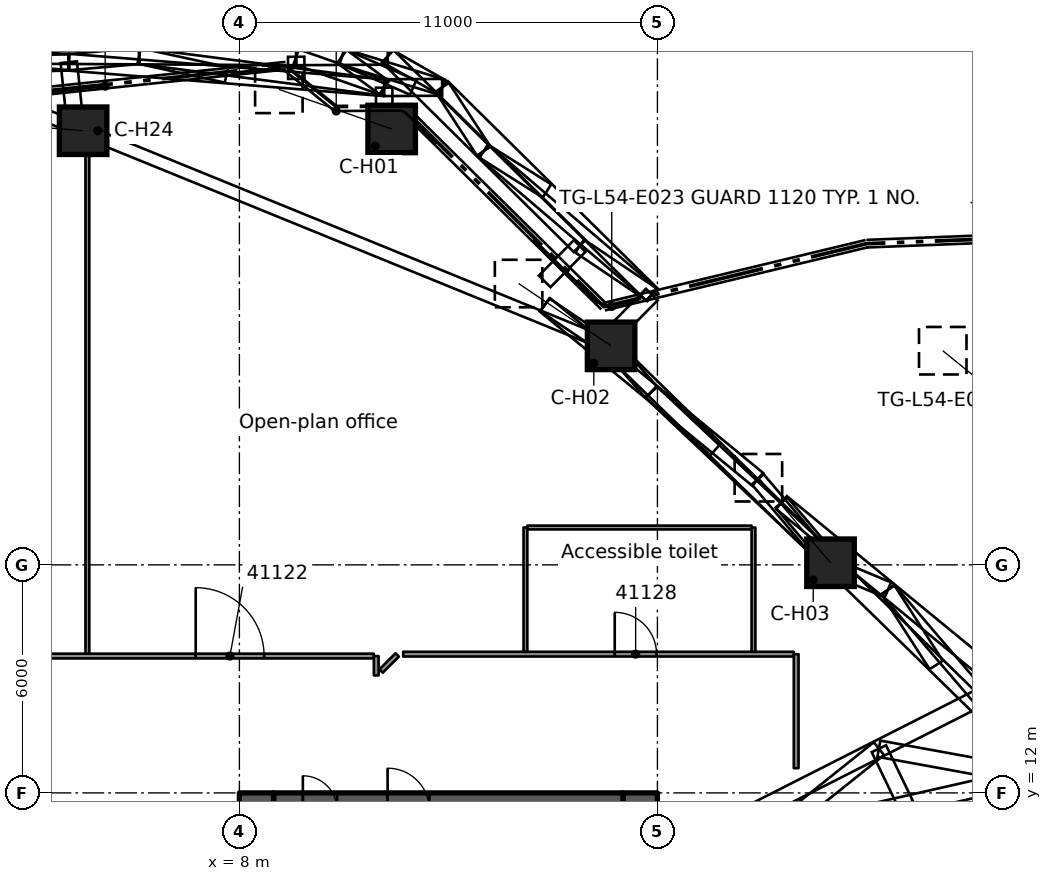
"""IFC4 building model, lengths in metres.
Left out: names, types, materials, properties, quantities, classifications, styles, units other than length and angle.
Written with IfcOpenShell. Run it as: python <this file> out.ifc"""

import sys

from ifc_helpers import new_model, si_unit, direction, frame, frame_2d, origin, origin_2d, place, context, subcontext, project, spatial, rectangle, extrude, element, fill, save


model = new_model("IFC4")
c1 = context("Model", 3, precision=1e-05, world=origin(), true_north=direction((0.0, 1.0)))
c2 = subcontext(c1, "Body", "Model", "MODEL_VIEW")
j1 = project(units=[si_unit("LENGTHUNIT", "METRE"), si_unit("PLANEANGLEUNIT", "RADIAN")], contexts=[c1])
p1 = place(None, origin())
s1 = spatial("IfcSite", under=j1, at=p1, CompositionType="ELEMENT")
p2 = place(p1, origin())
s2 = spatial("IfcBuilding", under=s1, at=p2, CompositionType="ELEMENT")
p3 = place(p2, frame((0.0, 0.0, 206.1)))
s3 = spatial("IfcBuildingStorey", under=s2, at=p3, CompositionType="ELEMENT", Elevation=206.1)
p4 = place(p3, frame((8.9, 11.55, 0.0), z_axis=(0.0, 0.0, 1.0), x_axis=(1.0, 0.0, 0.0)))
e1 = element("IfcWall", 1, at=p4, inside=s3, PredefinedType="SHEAR", context=c2, shape_type="SweptSolid", body=[
    extrude(rectangle(XDim=9.2, YDim=0.9, at=frame_2d((4.6, 0.0))), origin(), (0.0, 0.0, 1.0), 4.4),
])
p5 = place(p4, frame((3.0, 0.0, 0.0)))
e2 = element("IfcOpeningElement", 2, at=p5, cuts=e1, PredefinedType="OPENING", context=c2, shape_type="SweptSolid", body=[
    extrude(rectangle(XDim=1.1, YDim=2.1, at=frame_2d((0.55, 1.05))), frame((0.0, 0.46, 0.0), z_axis=(0.0, -1.0, 0.0), x_axis=(1.0, 0.0, 0.0)), (0.0, 0.0, 1.0), 0.92),
])
p6 = place(p4, frame((0.77, 0.0, 0.0)))
e3 = element("IfcOpeningElement", 3, at=p6, cuts=e1, PredefinedType="OPENING", context=c2, shape_type="SweptSolid", body=[
    extrude(rectangle(XDim=0.9, YDim=2.1, at=frame_2d((0.45, 1.05))), frame((0.0, 0.46, 0.0), z_axis=(0.0, -1.0, 0.0), x_axis=(1.0, 0.0, 0.0)), (0.0, 0.0, 1.0), 0.92),
])
p7 = place(p3, frame((8.45, -12.0, 0.0), z_axis=(0.0, 0.0, 1.0), x_axis=(0.0, 1.0, 0.0)))
e4 = element("IfcWall", 4, at=p7, inside=s3, PredefinedType="SHEAR", context=c2, shape_type="SweptSolid", body=[
    extrude(rectangle(XDim=24.0, YDim=0.9, at=frame_2d((12.0, 0.0))), origin(), (0.0, 0.0, 1.0), 4.4),
])
p8 = place(p7, frame((12.6, 0.0, 0.0)))
e5 = element("IfcOpeningElement", 5, at=p8, cuts=e4, PredefinedType="OPENING", context=c2, shape_type="SweptSolid", body=[
    extrude(rectangle(XDim=1.8, YDim=2.1, at=frame_2d((0.9, 1.05))), frame((0.0, 0.46, 0.0), z_axis=(0.0, -1.0, 0.0), x_axis=(1.0, 0.0, 0.0)), (0.0, 0.0, 1.0), 0.92),
])
p9 = place(p7, frame((16.3, 0.0, 0.0)))
e6 = element("IfcOpeningElement", 6, at=p9, cuts=e4, PredefinedType="OPENING", context=c2, shape_type="SweptSolid", body=[
    extrude(rectangle(XDim=1.8, YDim=2.1, at=frame_2d((0.9, 1.05))), frame((0.0, 0.46, 0.0), z_axis=(0.0, -1.0, 0.0), x_axis=(1.0, 0.0, 0.0)), (0.0, 0.0, 1.0), 0.92),
])
p10 = place(p7, frame((9.6, 0.0, 0.0)))
e7 = element("IfcOpeningElement", 7, at=p10, cuts=e4, PredefinedType="OPENING", context=c2, shape_type="SweptSolid", body=[
    extrude(rectangle(XDim=1.8, YDim=2.1, at=frame_2d((0.9, 1.05))), frame((0.0, 0.46, 0.0), z_axis=(0.0, -1.0, 0.0), x_axis=(1.0, 0.0, 0.0)), (0.0, 0.0, 1.0), 0.92),
])
p11 = place(p7, frame((3.25, 0.0, 0.0)))
e8 = element("IfcOpeningElement", 8, at=p11, cuts=e4, PredefinedType="OPENING", context=c2, shape_type="SweptSolid", body=[
    extrude(rectangle(XDim=1.1, YDim=2.1, at=frame_2d((0.55, 1.05))), frame((0.0, 0.46, 0.0), z_axis=(0.0, -1.0, 0.0), x_axis=(1.0, 0.0, 0.0)), (0.0, 0.0, 1.0), 0.92),
])
p12 = place(p3, frame((18.55, -12.0, 0.0), z_axis=(0.0, 0.0, 1.0), x_axis=(0.0, 1.0, 0.0)))
e9 = element("IfcWall", 9, at=p12, inside=s3, PredefinedType="SHEAR", context=c2, shape_type="SweptSolid", body=[
    extrude(rectangle(XDim=24.0, YDim=0.9, at=frame_2d((12.0, 0.0))), origin(), (0.0, 0.0, 1.0), 4.4),
])
p13 = place(p12, frame((16.3, 0.0, 0.0)))
e10 = element("IfcOpeningElement", 10, at=p13, cuts=e9, PredefinedType="OPENING", context=c2, shape_type="SweptSolid", body=[
    extrude(rectangle(XDim=1.8, YDim=2.1, at=frame_2d((0.9, 1.05))), frame((0.0, 0.46, 0.0), z_axis=(0.0, -1.0, 0.0), x_axis=(1.0, 0.0, 0.0)), (0.0, 0.0, 1.0), 0.92),
])
p14 = place(p12, frame((12.1, 0.0, 0.0)))
e11 = element("IfcOpeningElement", 11, at=p14, cuts=e9, PredefinedType="OPENING", context=c2, shape_type="SweptSolid", body=[
    extrude(rectangle(XDim=1.8, YDim=2.1, at=frame_2d((0.9, 1.05))), frame((0.0, 0.46, 0.0), z_axis=(0.0, -1.0, 0.0), x_axis=(1.0, 0.0, 0.0)), (0.0, 0.0, 1.0), 0.92),
])
p15 = place(p12, frame((7.9, 0.0, 0.0)))
e12 = element("IfcOpeningElement", 12, at=p15, cuts=e9, PredefinedType="OPENING", context=c2, shape_type="SweptSolid", body=[
    extrude(rectangle(XDim=1.8, YDim=2.1, at=frame_2d((0.9, 1.05))), frame((0.0, 0.46, 0.0), z_axis=(0.0, -1.0, 0.0), x_axis=(1.0, 0.0, 0.0)), (0.0, 0.0, 1.0), 0.92),
])
p16 = place(p3, frame((29.703, 21.038, 0.479), z_axis=(-0.595415125764, 0.483985227934, 0.641279289509), x_axis=(-0.630757809366, -0.775979758707, 0.0)))
e13 = element("IfcColumn", 13, at=p16, inside=s3, PredefinedType="COLUMN", context=c2, shape_type="SweptSolid", body=[
    extrude(rectangle(XDim=1.25, YDim=1.25, at=origin_2d()), origin(), (0.0, 0.0, 1.0), 5.366),
])
p17 = place(p3, frame((12.007, 29.47, 0.413), z_axis=(-0.623513084536, 0.21882689292, 0.750563937548), x_axis=(-0.331155585117, -0.943576164623, 0.0)))
e14 = element("IfcColumn", 14, at=p17, inside=s3, PredefinedType="COLUMN", context=c2, shape_type="SweptSolid", body=[
    extrude(rectangle(XDim=1.25, YDim=1.25, at=origin_2d()), origin(), (0.0, 0.0, 1.0), 4.762),
])
p18 = place(p3, frame((17.781, 23.763, 0.394), z_axis=(-0.523026204983, 0.352426283358, 0.776040787394), x_axis=(-0.558801233735, -0.829301622557, 0.0)))
e15 = element("IfcColumn", 15, at=p18, inside=s3, PredefinedType="COLUMN", context=c2, shape_type="SweptSolid", body=[
    extrude(rectangle(XDim=1.25, YDim=1.25, at=origin_2d()), origin(), (0.0, 0.0, 1.0), 4.654),
])
p19 = place(p3, frame((23.555, 18.056, 0.394), z_axis=(-0.407867599836, 0.480742322781, 0.776228600408), x_axis=(-0.762536504129, -0.646945190778, 0.0)))
e16 = element("IfcColumn", 16, at=p19, inside=s3, PredefinedType="COLUMN", context=c2, shape_type="SweptSolid", body=[
    extrude(rectangle(XDim=1.25, YDim=1.25, at=origin_2d()), origin(), (0.0, 0.0, 1.0), 4.653),
])
p20 = place(p3, frame((29.329, 12.349, 0.413), z_axis=(-0.286274556016, 0.5954182598, 0.750682339258), x_axis=(-0.901243098623, -0.433313832209, 0.0)))
e17 = element("IfcColumn", 17, at=p20, inside=s3, PredefinedType="COLUMN", context=c2, shape_type="SweptSolid", body=[
    extrude(rectangle(XDim=1.25, YDim=1.25, at=origin_2d()), origin(), (0.0, 0.0, 1.0), 4.761),
])
p21 = place(p3, frame((3.888, 29.423, 0.394), z_axis=(-0.628357788529, 0.051576127766, 0.776212852663), x_axis=(-0.081805717627, -0.99664829532, 0.0)))
e18 = element("IfcColumn", 18, at=p21, inside=s3, PredefinedType="COLUMN", context=c2, shape_type="SweptSolid", body=[
    extrude(rectangle(XDim=1.25, YDim=1.25, at=origin_2d()), origin(), (0.0, 0.0, 1.0), 4.653),
])
p22 = place(p3, frame((-11.537, 15.601, 0.0), z_axis=(0.0, 0.0, 1.0), x_axis=(1.0, 0.0, 0.0)))
e19 = element("IfcWall", 19, at=p22, inside=s3, PredefinedType="PARTITIONING", context=c2, shape_type="SweptSolid", body=[
    extrude(rectangle(XDim=23.074, YDim=0.125, at=frame_2d((11.537, 0.0))), origin(), (0.0, 0.0, 1.0), 3.98),
])
p23 = place(p22, frame((18.387, 0.0, 0.0)))
e20 = element("IfcOpeningElement", 20, at=p23, cuts=e19, PredefinedType="OPENING", context=c2, shape_type="SweptSolid", body=[
    extrude(rectangle(XDim=1.8, YDim=2.1, at=frame_2d((0.9, 1.05))), frame((0.0, 0.073, 0.0), z_axis=(0.0, -1.0, 0.0), x_axis=(1.0, 0.0, 0.0)), (0.0, 0.0, 1.0), 0.145),
])
p24 = place(p22, frame((11.088, 0.0, 0.0)))
e21 = element("IfcOpeningElement", 21, at=p24, cuts=e19, PredefinedType="OPENING", context=c2, shape_type="SweptSolid", body=[
    extrude(rectangle(XDim=1.1, YDim=2.1, at=frame_2d((0.55, 1.05))), frame((0.0, 0.073, 0.0), z_axis=(0.0, -1.0, 0.0), x_axis=(1.0, 0.0, 0.0)), (0.0, 0.0, 1.0), 0.145),
])
p25 = place(p22, frame((3.288, 0.0, 0.0)))
e22 = element("IfcOpeningElement", 22, at=p25, cuts=e19, PredefinedType="OPENING", context=c2, shape_type="SweptSolid", body=[
    extrude(rectangle(XDim=1.1, YDim=2.1, at=frame_2d((0.55, 1.05))), frame((0.0, 0.073, 0.0), z_axis=(0.0, -1.0, 0.0), x_axis=(1.0, 0.0, 0.0)), (0.0, 0.0, 1.0), 0.145),
])
p26 = place(p3, frame((12.311, 15.651, 0.0), z_axis=(0.0, 0.0, 1.0), x_axis=(1.0, 0.0, 0.0)))
e23 = element("IfcWall", 23, at=p26, inside=s3, PredefinedType="PARTITIONING", context=c2, shape_type="SweptSolid", body=[
    extrude(rectangle(XDim=10.276, YDim=0.125, at=frame_2d((5.138, 0.0))), origin(), (0.0, 0.0, 1.0), 3.98),
])
p27 = place(p26, frame((5.566, 0.0, 0.0)))
e24 = element("IfcOpeningElement", 24, at=p27, cuts=e23, PredefinedType="OPENING", context=c2, shape_type="SweptSolid", body=[
    extrude(rectangle(XDim=1.1, YDim=2.1, at=frame_2d((0.55, 1.05))), frame((0.0, 0.073, 0.0), z_axis=(0.0, -1.0, 0.0), x_axis=(1.0, 0.0, 0.0)), (0.0, 0.0, 1.0), 0.145),
])
p28 = place(p3, frame((15.577, 18.983, 0.0), z_axis=(0.0, 0.0, 1.0), x_axis=(1.0, 0.0, 0.0)))
e25 = element("IfcWall", 25, at=p28, inside=s3, PredefinedType="PARTITIONING", context=c2, shape_type="SweptSolid", body=[
    extrude(rectangle(XDim=5.9, YDim=0.1, at=frame_2d((2.95, 0.0))), origin(), (0.0, 0.0, 1.0), 3.98),
])
p29 = place(p3, frame((11.729, 15.207, 0.0), z_axis=(0.0, 0.0, 1.0), x_axis=(0.707106781187, 0.707106781187, 0.0)))
e26 = element("IfcWall", 26, at=p29, inside=s3, PredefinedType="PARTITIONING", context=c2, shape_type="SweptSolid", body=[
    extrude(rectangle(XDim=0.6, YDim=0.125, at=frame_2d((0.3, 0.0))), origin(), (0.0, 0.0, 1.0), 3.98),
])
p30 = place(p3, frame((22.651, 12.651, 0.0), z_axis=(0.0, 0.0, 1.0), x_axis=(0.0, 1.0, 0.0)))
e27 = element("IfcWall", 27, at=p30, inside=s3, PredefinedType="PARTITIONING", context=c2, shape_type="SweptSolid", body=[
    extrude(rectangle(XDim=2.999, YDim=0.125, at=frame_2d((1.5, 0.0))), origin(), (0.0, 0.0, 1.0), 3.98),
])
p31 = place(p3, frame((21.528, 15.713, 0.0), z_axis=(0.0, 0.0, 1.0), x_axis=(0.0, 1.0, 0.0)))
e28 = element("IfcWall", 28, at=p31, inside=s3, PredefinedType="PARTITIONING", context=c2, shape_type="SweptSolid", body=[
    extrude(rectangle(XDim=3.269, YDim=0.1, at=frame_2d((1.635, 0.0))), origin(), (0.0, 0.0, 1.0), 3.98),
])
p32 = place(p3, frame((15.527, 15.713, 0.0), z_axis=(0.0, 0.0, 1.0), x_axis=(0.0, 1.0, 0.0)))
e29 = element("IfcWall", 29, at=p32, inside=s3, PredefinedType="PARTITIONING", context=c2, shape_type="SweptSolid", body=[
    extrude(rectangle(XDim=3.27, YDim=0.1, at=frame_2d((1.635, 0.0))), origin(), (0.0, 0.0, 1.0), 3.98),
])
p33 = place(p3, frame((11.601, 15.092, 0.0), z_axis=(0.0, 0.0, 1.0), x_axis=(0.0, 1.0, 0.0)))
e30 = element("IfcWall", 30, at=p33, inside=s3, PredefinedType="PARTITIONING", context=c2, shape_type="SweptSolid", body=[
    extrude(rectangle(XDim=0.508, YDim=0.125, at=frame_2d((0.254, 0.0))), origin(), (0.0, 0.0, 1.0), 3.98),
])
p34 = place(p3, frame((4.0, 15.664, 0.0), z_axis=(0.0, 0.0, 1.0), x_axis=(0.0, 1.0, 0.0)))
e31 = element("IfcWall", 31, at=p34, inside=s3, PredefinedType="PARTITIONING", context=c2, shape_type="SweptSolid", body=[
    extrude(rectangle(XDim=13.944, YDim=0.1, at=frame_2d((6.972, 0.0))), origin(), (0.0, 0.0, 1.0), 3.98),
])
p35 = place(p23, origin())
e32 = element("IfcDoor", 32, at=p35, inside=s3, OperationType="DOUBLE_DOOR_SINGLE_SWING", PredefinedType="DOOR", context=c2, shape_type="SweptSolid", body=[
    extrude(rectangle(XDim=1.8, YDim=2.1, at=frame_2d((0.9, 1.05))), frame((0.0, 0.025, 0.0), z_axis=(0.0, -1.0, 0.0), x_axis=(1.0, 0.0, 0.0)), (0.0, 0.0, 1.0), 0.05),
])
fill(e20, e32)
p36 = place(p27, origin())
e33 = element("IfcDoor", 33, at=p36, inside=s3, OperationType="SINGLE_SWING_RIGHT", PredefinedType="DOOR", context=c2, shape_type="SweptSolid", body=[
    extrude(rectangle(XDim=1.1, YDim=2.1, at=frame_2d((0.55, 1.05))), frame((0.0, 0.025, 0.0), z_axis=(0.0, -1.0, 0.0), x_axis=(1.0, 0.0, 0.0)), (0.0, 0.0, 1.0), 0.05),
])
fill(e24, e33)
save(model, sys.argv[1])
